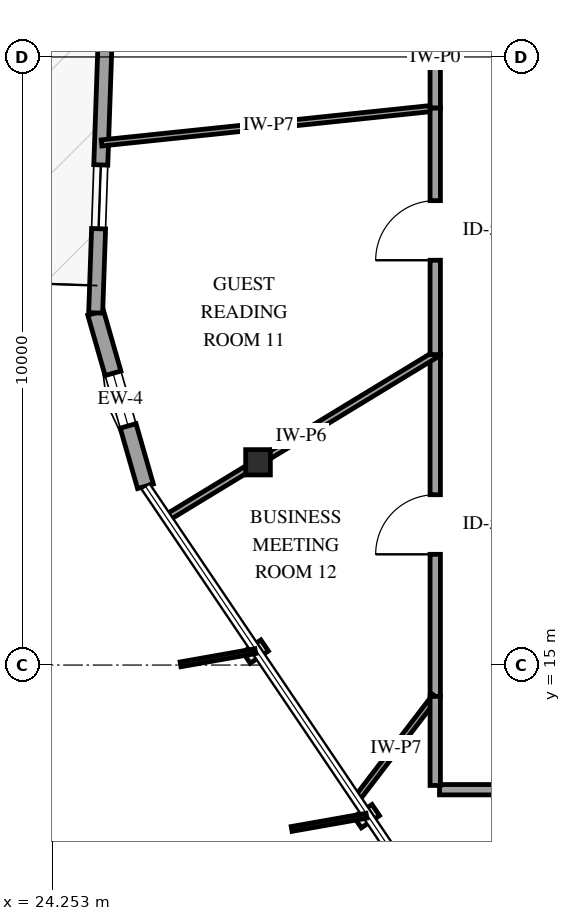
"""IFC4 building model, lengths in metres.
Left out: names, types, materials, properties, quantities, classifications, styles, units other than length and angle.
Written with IfcOpenShell. Run it as: python <this file> out.ifc"""

import sys

from ifc_helpers import new_model, si_unit, direction, frame, frame_2d, origin, origin_2d, place, context, subcontext, project, spatial, rectangle, i_section, extrude, element, fill, save


model = new_model("IFC4")
c1 = context("Model", 3, precision=1e-05, world=origin(), true_north=direction((0.0, 1.0)))
c2 = subcontext(c1, "Body", "Model", "MODEL_VIEW")
j1 = project(units=[si_unit("LENGTHUNIT", "METRE"), si_unit("PLANEANGLEUNIT", "RADIAN")], contexts=[c1])
p1 = place(None, origin())
s1 = spatial("IfcSite", under=j1, at=p1, CompositionType="ELEMENT")
p2 = place(p1, origin())
s2 = spatial("IfcBuilding", under=s1, at=p2, CompositionType="ELEMENT")
p3 = place(p2, frame((0.0, 0.0, 223.0)))
s3 = spatial("IfcBuildingStorey", under=s2, at=p3, CompositionType="ELEMENT", Elevation=223.0)
p4 = place(p3, frame((27.635, 18.334, 0.0), z_axis=(0.0, 0.0, 1.0), x_axis=(1.0, 0.0, 0.0)))
e1 = element("IfcColumn", 1, at=p4, inside=s3, PredefinedType="COLUMN", context=c2, shape_type="SweptSolid", body=[
    extrude(i_section(OverallWidth=0.406, OverallDepth=0.416, WebThickness=0.03, FlangeThickness=0.048, FilletRadius=0.038, at=origin_2d()), origin(), (0.0, 0.0, 1.0), 3.6),
])
p5 = place(p3, frame((24.966, 20.791, 0.0), z_axis=(0.0, 0.0, 1.0), x_axis=(0.275927353379, -0.961178493131, 0.0)))
e2 = element("IfcWall", 2, at=p5, inside=s3, PredefinedType="SOLIDWALL", context=c2, shape_type="SweptSolid", body=[
    extrude(rectangle(XDim=2.967, YDim=0.27, at=frame_2d((1.483, 0.0))), origin(), (0.0, 0.0, 1.0), 2.679),
])
p6 = place(p5, frame((1.033, 0.0, 0.75)))
e3 = element("IfcOpeningElement", 3, at=p6, cuts=e2, PredefinedType="OPENING", context=c2, shape_type="SweptSolid", body=[
    extrude(rectangle(XDim=0.9, YDim=1.5, at=frame_2d((0.45, 0.75))), frame((0.0, 0.145, 0.0), z_axis=(0.0, -1.0, 0.0), x_axis=(1.0, 0.0, 0.0)), (0.0, 0.0, 1.0), 0.29),
])
p7 = place(p3, frame((25.304, 30.583, 0.0), z_axis=(0.0, 0.0, 1.0), x_axis=(-0.034536942247, -0.999403421857, 0.0)))
e4 = element("IfcWall", 4, at=p7, inside=s3, PredefinedType="SOLIDWALL", context=c2, shape_type="SweptSolid", body=[
    extrude(rectangle(XDim=9.798, YDim=0.23, at=frame_2d((4.899, 0.0))), origin(), (0.0, 0.0, 1.0), 2.679),
])
p8 = place(p7, frame((4.399, 0.0, 0.0)))
e5 = element("IfcOpeningElement", 5, at=p8, cuts=e4, PredefinedType="OPENING", context=c2, shape_type="SweptSolid", body=[
    extrude(rectangle(XDim=1.0, YDim=2.15, at=frame_2d((0.5, 1.075))), frame((0.0, 0.125, 0.0), z_axis=(0.0, -1.0, 0.0), x_axis=(1.0, 0.0, 0.0)), (0.0, 0.0, 1.0), 0.25),
])
p9 = place(p7, frame((0.629, 0.0, 0.72)))
e6 = element("IfcOpeningElement", 6, at=p9, cuts=e4, PredefinedType="OPENING", context=c2, shape_type="SweptSolid", body=[
    extrude(rectangle(XDim=1.05, YDim=1.55, at=frame_2d((0.525, 0.775))), frame((0.0, 0.125, 0.0), z_axis=(0.0, -1.0, 0.0), x_axis=(1.0, 0.0, 0.0)), (0.0, 0.0, 1.0), 0.25),
])
p10 = place(p7, frame((7.362, 0.0, 0.72)))
e7 = element("IfcOpeningElement", 7, at=p10, cuts=e4, PredefinedType="OPENING", context=c2, shape_type="SweptSolid", body=[
    extrude(rectangle(XDim=1.05, YDim=1.55, at=frame_2d((0.525, 0.775))), frame((0.0, 0.125, 0.0), z_axis=(0.0, -1.0, 0.0), x_axis=(1.0, 0.0, 0.0)), (0.0, 0.0, 1.0), 0.25),
])
p11 = place(p3, frame((30.55, 14.485, 0.0), z_axis=(0.0, 0.0, 1.0), x_axis=(0.0, 1.0, 0.0)))
e8 = element("IfcWall", 8, at=p11, inside=s3, PredefinedType="PARTITIONING", context=c2, shape_type="SweptSolid", body=[
    extrude(rectangle(XDim=5.621, YDim=0.17, at=frame_2d((2.811, 0.0))), origin(), (0.0, 0.0, 1.0), 3.3),
])
p12 = place(p11, frame((2.336, 0.0, 0.0)))
e9 = element("IfcOpeningElement", 9, at=p12, cuts=e8, PredefinedType="OPENING", context=c2, shape_type="SweptSolid", body=[
    extrude(rectangle(XDim=0.98, YDim=2.15, at=frame_2d((0.49, 1.075))), frame((0.0, 0.095, 0.0), z_axis=(0.0, -1.0, 0.0), x_axis=(1.0, 0.0, 0.0)), (0.0, 0.0, 1.0), 0.19),
])
p13 = place(p3, frame((30.55, 24.159, 0.0), z_axis=(0.0, 0.0, 1.0), x_axis=(-0.994593588522, -0.103844083467, 0.0)))
e10 = element("IfcWall", 10, at=p13, inside=s3, PredefinedType="PARTITIONING", context=c2, shape_type="SweptSolid", body=[
    extrude(rectangle(XDim=5.518, YDim=0.1, at=frame_2d((2.759, 0.0))), origin(), (0.0, 0.0, 1.0), 2.674),
])
p14 = place(p3, frame((30.55, 20.106, 0.0), z_axis=(0.0, 0.0, 1.0), x_axis=(-0.854452043928, -0.519530273061, 0.0)))
e11 = element("IfcWall", 11, at=p14, inside=s3, PredefinedType="PARTITIONING", context=c2, shape_type="SweptSolid", body=[
    extrude(rectangle(XDim=5.168, YDim=0.11, at=frame_2d((2.584, 0.0))), origin(), (0.0, 0.0, 1.0), 2.678),
])
p15 = place(p3, frame((35.719, 12.95, 0.0), z_axis=(0.0, 0.0, 1.0), x_axis=(-1.0, 0.0, 0.0)))
e12 = element("IfcWall", 12, at=p15, inside=s3, PredefinedType="PARTITIONING", context=c2, shape_type="SweptSolid", body=[
    extrude(rectangle(XDim=5.099, YDim=0.17, at=frame_2d((2.549, 0.0))), origin(), (0.0, 0.0, 1.0), 3.3),
])
p16 = place(p15, frame((2.075, 0.0, 0.0)))
e13 = element("IfcOpeningElement", 13, at=p16, cuts=e12, PredefinedType="OPENING", context=c2, shape_type="SweptSolid", body=[
    extrude(rectangle(XDim=0.98, YDim=2.15, at=frame_2d((0.49, 1.075))), frame((0.0, 0.095, 0.0), z_axis=(0.0, -1.0, 0.0), x_axis=(1.0, 0.0, 0.0)), (0.0, 0.0, 1.0), 0.19),
])
p17 = place(p3, frame((30.55, 24.159, 0.0), z_axis=(0.0, 0.0, 1.0), x_axis=(0.0, 1.0, 0.0)))
e14 = element("IfcWall", 14, at=p17, inside=s3, PredefinedType="PARTITIONING", context=c2, shape_type="SweptSolid", body=[
    extrude(rectangle(XDim=4.192, YDim=0.17, at=frame_2d((2.096, 0.0))), origin(), (0.0, 0.0, 1.0), 3.3),
])
p18 = place(p17, frame((1.621, 0.0, 0.0)))
e15 = element("IfcOpeningElement", 15, at=p18, cuts=e14, PredefinedType="OPENING", context=c2, shape_type="SweptSolid", body=[
    extrude(rectangle(XDim=0.98, YDim=2.15, at=frame_2d((0.49, 1.075))), frame((0.0, 0.095, 0.0), z_axis=(0.0, -1.0, 0.0), x_axis=(1.0, 0.0, 0.0)), (0.0, 0.0, 1.0), 0.19),
])
p19 = place(p3, frame((30.55, 20.106, 0.0), z_axis=(0.0, 0.0, 1.0), x_axis=(0.0, 1.0, 0.0)))
e16 = element("IfcWall", 16, at=p19, inside=s3, PredefinedType="PARTITIONING", context=c2, shape_type="SweptSolid", body=[
    extrude(rectangle(XDim=4.053, YDim=0.17, at=frame_2d((2.026, 0.0))), origin(), (0.0, 0.0, 1.0), 3.3),
])
p20 = place(p19, frame((1.551, 0.0, 0.0)))
e17 = element("IfcOpeningElement", 17, at=p20, cuts=e16, PredefinedType="OPENING", context=c2, shape_type="SweptSolid", body=[
    extrude(rectangle(XDim=0.98, YDim=2.15, at=frame_2d((0.49, 1.075))), frame((0.0, 0.095, 0.0), z_axis=(0.0, -1.0, 0.0), x_axis=(1.0, 0.0, 0.0)), (0.0, 0.0, 1.0), 0.19),
])
p21 = place(p3, frame((30.55, 14.485, 0.0), z_axis=(0.0, 0.0, 1.0), x_axis=(-0.607590625291, -0.794250358551, 0.0)))
e18 = element("IfcWall", 18, at=p21, inside=s3, PredefinedType="PARTITIONING", context=c2, shape_type="SweptSolid", body=[
    extrude(rectangle(XDim=2.128, YDim=0.1, at=frame_2d((1.064, 0.0))), origin(), (0.0, 0.0, 1.0), 3.3),
])
p22 = place(p3, frame((30.55, 13.02, 0.0), z_axis=(0.0, 0.0, 1.0), x_axis=(0.0, 1.0, 0.0)))
e19 = element("IfcWall", 19, at=p22, inside=s3, PredefinedType="PARTITIONING", context=c2, shape_type="SweptSolid", body=[
    extrude(rectangle(XDim=1.465, YDim=0.17, at=frame_2d((0.732, 0.0))), origin(), (0.0, 0.0, 1.0), 3.3),
])
p23 = place(p6, origin())
e20 = element("IfcWindow", 20, at=p23, inside=s3, PartitioningType="SINGLE_PANEL", PredefinedType="WINDOW", context=c2, shape_type="SweptSolid", body=[
    extrude(rectangle(XDim=0.9, YDim=1.5, at=frame_2d((0.45, 0.75))), frame((0.0, 0.03, 0.0), z_axis=(0.0, -1.0, 0.0), x_axis=(1.0, 0.0, 0.0)), (0.0, 0.0, 1.0), 0.06),
])
fill(e3, e20)
p24 = place(p10, origin())
e21 = element("IfcWindow", 21, at=p24, inside=s3, PartitioningType="SINGLE_PANEL", PredefinedType="WINDOW", context=c2, shape_type="SweptSolid", body=[
    extrude(rectangle(XDim=1.05, YDim=1.55, at=frame_2d((0.525, 0.775))), frame((0.0, 0.03, 0.0), z_axis=(0.0, -1.0, 0.0), x_axis=(1.0, 0.0, 0.0)), (0.0, 0.0, 1.0), 0.06),
])
fill(e7, e21)
p25 = place(p12, origin())
e22 = element("IfcDoor", 22, at=p25, inside=s3, OperationType="SINGLE_SWING_LEFT", PredefinedType="DOOR", context=c2, shape_type="SweptSolid", body=[
    extrude(rectangle(XDim=0.98, YDim=2.15, at=frame_2d((0.49, 1.075))), frame((0.0, 0.025, 0.0), z_axis=(0.0, -1.0, 0.0), x_axis=(1.0, 0.0, 0.0)), (0.0, 0.0, 1.0), 0.05),
])
fill(e9, e22)
p26 = place(p20, origin())
e23 = element("IfcDoor", 23, at=p26, inside=s3, OperationType="SINGLE_SWING_LEFT", PredefinedType="DOOR", context=c2, shape_type="SweptSolid", body=[
    extrude(rectangle(XDim=0.98, YDim=2.15, at=frame_2d((0.49, 1.075))), frame((0.0, 0.025, 0.0), z_axis=(0.0, -1.0, 0.0), x_axis=(1.0, 0.0, 0.0)), (0.0, 0.0, 1.0), 0.05),
])
fill(e17, e23)
save(model, sys.argv[1])
